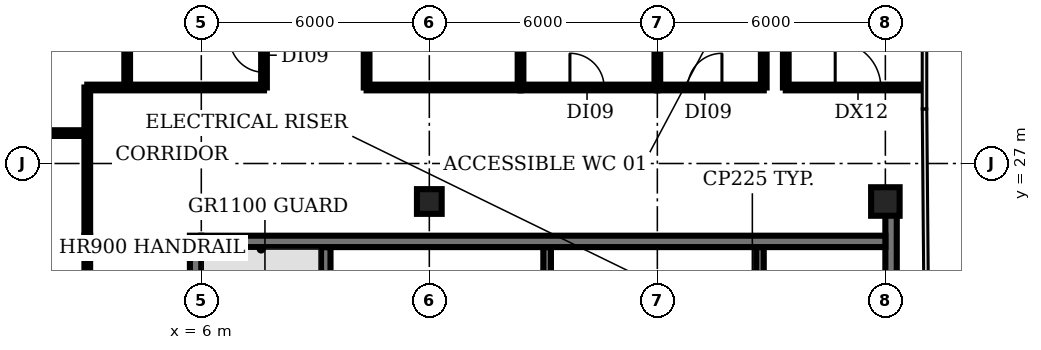
"""IFC4 building model, lengths in metres.
Left out: names, types, materials, properties, quantities, classifications, styles, units other than length and angle.
Written with IfcOpenShell. Run it as: python <this file> out.ifc"""

import sys

from ifc_helpers import new_model, si_unit, direction, frame, frame_2d, origin, origin_2d, place, context, subcontext, project, spatial, rectangle, extrude, element, fill, save


model = new_model("IFC4")
c1 = context("Model", 3, precision=1e-05, world=origin(), true_north=direction((0.0, 1.0)))
c2 = subcontext(c1, "Body", "Model", "MODEL_VIEW")
j1 = project(units=[si_unit("LENGTHUNIT", "METRE"), si_unit("PLANEANGLEUNIT", "RADIAN")], contexts=[c1])
p1 = place(None, origin())
s1 = spatial("IfcSite", under=j1, at=p1, CompositionType="ELEMENT")
p2 = place(p1, origin())
s2 = spatial("IfcBuilding", under=s1, at=p2, CompositionType="ELEMENT")
p3 = place(p2, frame((0.0, 0.0, 289.4)))
s3 = spatial("IfcBuildingStorey", under=s2, at=p3, CompositionType="ELEMENT", Elevation=289.4)
p4 = place(p3, frame((12.0, 26.0, 0.0), z_axis=(0.0, 0.0, 1.0), x_axis=(1.0, 0.0, 0.0)))
e1 = element("IfcColumn", 1, at=p4, inside=s3, PredefinedType="COLUMN", context=c2, shape_type="SweptSolid", body=[
    extrude(rectangle(XDim=0.65, YDim=0.65, at=origin_2d()), origin(), (0.0, 0.0, 1.0), 3.85),
])
p5 = place(p3, frame((24.0, 26.0, 0.0), z_axis=(0.0, 0.0, 1.0), x_axis=(1.0, 0.0, 0.0)))
e2 = element("IfcColumn", 2, at=p5, inside=s3, PredefinedType="COLUMN", context=c2, shape_type="SweptSolid", body=[
    extrude(rectangle(XDim=0.75, YDim=0.75, at=origin_2d()), origin(), (0.0, 0.0, 1.0), 3.85),
])
p6 = place(p3, frame((9.275, 18.375, 0.0), z_axis=(0.0, 0.0, 1.0), x_axis=(0.0, 1.0, 0.0)))
e3 = element("IfcWall", 3, at=p6, inside=s3, PredefinedType="SHEAR", context=c2, shape_type="SweptSolid", body=[
    extrude(rectangle(XDim=6.425, YDim=0.25, at=frame_2d((3.212, 0.0))), origin(), (0.0, 0.0, 1.0), 3.85),
])
for number, where, z_axis, x_axis in (
    (4, (15.1, 22.9, 0.0), (0.0, 0.0, 1.0), (0.0, 1.0, 0.0)),
    (5, (20.7, 22.9, 0.0), (0.0, 0.0, 1.0), (0.0, 1.0, 0.0)),
):
    element("IfcWall", number, at=place(p3, frame(where, z_axis=z_axis, x_axis=x_axis)), inside=s3, PredefinedType="SHEAR", context=c2, shape_type="SweptSolid", body=[
        extrude(rectangle(XDim=1.9, YDim=0.2, at=frame_2d((0.95, 0.0))), origin(), (0.0, 0.0, 1.0), 3.85),
    ])
p7 = place(p3, frame((5.85, 5.1, 0.0), z_axis=(0.0, 0.0, 1.0), x_axis=(0.0, 1.0, 0.0)))
e6 = element("IfcWall", 6, at=p7, inside=s3, PredefinedType="SHEAR", context=c2, shape_type="SweptSolid", body=[
    extrude(rectangle(XDim=20.0, YDim=0.3, at=frame_2d((10.0, 0.0))), origin(), (0.0, 0.0, 1.0), 3.85),
])
p8 = place(p7, frame((0.55, 0.0, 0.0)))
e7 = element("IfcOpeningElement", 7, at=p8, cuts=e6, PredefinedType="OPENING", context=c2, shape_type="SweptSolid", body=[
    extrude(rectangle(XDim=1.5, YDim=2.1, at=frame_2d((0.75, 1.05))), frame((0.0, 0.16, 0.0), z_axis=(0.0, -1.0, 0.0), x_axis=(1.0, 0.0, 0.0)), (0.0, 0.0, 1.0), 0.32),
])
p9 = place(p7, frame((7.0, 0.0, 0.0)))
e8 = element("IfcOpeningElement", 8, at=p9, cuts=e6, PredefinedType="OPENING", context=c2, shape_type="SweptSolid", body=[
    extrude(rectangle(XDim=1.2, YDim=2.1, at=frame_2d((0.6, 1.05))), frame((0.0, 0.16, 0.0), z_axis=(0.0, -1.0, 0.0), x_axis=(1.0, 0.0, 0.0)), (0.0, 0.0, 1.0), 0.32),
])
p10 = place(p7, frame((13.55, 0.0, 0.0)))
e9 = element("IfcOpeningElement", 9, at=p10, cuts=e6, PredefinedType="OPENING", context=c2, shape_type="SweptSolid", body=[
    extrude(rectangle(XDim=1.2, YDim=2.1, at=frame_2d((0.6, 1.05))), frame((0.0, 0.16, 0.0), z_axis=(0.0, -1.0, 0.0), x_axis=(1.0, 0.0, 0.0)), (0.0, 0.0, 1.0), 0.32),
])
p11 = place(p3, frame((24.15, 25.655, 0.0), z_axis=(0.0, 0.0, 1.0), x_axis=(0.0, -1.0, 0.0)))
e10 = element("IfcWall", 10, at=p11, inside=s3, PredefinedType="SHEAR", context=c2, shape_type="SweptSolid", body=[
    extrude(rectangle(XDim=20.555, YDim=0.3, at=frame_2d((10.277, 0.0))), origin(), (0.0, 0.0, 1.0), 3.85),
])
p12 = place(p11, frame((18.505, 0.0, 0.0)))
e11 = element("IfcOpeningElement", 11, at=p12, cuts=e10, PredefinedType="OPENING", context=c2, shape_type="SweptSolid", body=[
    extrude(rectangle(XDim=1.5, YDim=2.1, at=frame_2d((0.75, 1.05))), frame((0.0, 0.16, 0.0), z_axis=(0.0, -1.0, 0.0), x_axis=(1.0, 0.0, 0.0)), (0.0, 0.0, 1.0), 0.32),
])
p13 = place(p11, frame((12.405, 0.0, 0.0)))
e12 = element("IfcOpeningElement", 12, at=p13, cuts=e10, PredefinedType="OPENING", context=c2, shape_type="SweptSolid", body=[
    extrude(rectangle(XDim=0.9, YDim=2.1, at=frame_2d((0.45, 1.05))), frame((0.0, 0.16, 0.0), z_axis=(0.0, -1.0, 0.0), x_axis=(1.0, 0.0, 0.0)), (0.0, 0.0, 1.0), 0.32),
])
p14 = place(p11, frame((6.405, 0.0, 0.0)))
e13 = element("IfcOpeningElement", 13, at=p14, cuts=e10, PredefinedType="OPENING", context=c2, shape_type="SweptSolid", body=[
    extrude(rectangle(XDim=2.0, YDim=2.1, at=frame_2d((1.0, 1.05))), frame((0.0, 0.16, 0.0), z_axis=(0.0, -1.0, 0.0), x_axis=(1.0, 0.0, 0.0)), (0.0, 0.0, 1.0), 0.32),
])
p15 = place(p3, frame((6.0, 24.95, 0.0), z_axis=(0.0, 0.0, 1.0), x_axis=(1.0, 0.0, 0.0)))
e14 = element("IfcWall", 14, at=p15, inside=s3, PredefinedType="SHEAR", context=c2, shape_type="SweptSolid", body=[
    extrude(rectangle(XDim=18.0, YDim=0.3, at=frame_2d((9.0, 0.0))), origin(), (0.0, 0.0, 1.0), 3.85),
])
p16 = place(p3, frame((-0.98, 27.8, 0.0), z_axis=(0.0, 0.0, 1.0), x_axis=(1.0, 0.0, 0.0)))
e15 = element("IfcWall", 15, at=p16, inside=s3, PredefinedType="PARTITIONING", context=c2, shape_type="SweptSolid", body=[
    extrude(rectangle(XDim=3.98, YDim=0.15, at=frame_2d((1.99, 0.0))), origin(), (0.0, 0.0, 1.0), 2.9),
])
p17 = place(p3, frame((3.0, 5.1, 0.0), z_axis=(0.0, 0.0, 1.0), x_axis=(0.0, 1.0, 0.0)))
e16 = element("IfcWall", 16, at=p17, inside=s3, PredefinedType="PARTITIONING", context=c2, shape_type="SweptSolid", body=[
    extrude(rectangle(XDim=20.0, YDim=0.15, at=frame_2d((10.0, 0.0))), origin(), (0.0, 0.0, 1.0), 2.9),
])
p18 = place(p17, frame((9.3, 0.0, 0.0)))
e17 = element("IfcOpeningElement", 17, at=p18, cuts=e16, PredefinedType="OPENING", context=c2, shape_type="SweptSolid", body=[
    extrude(rectangle(XDim=1.2, YDim=2.1, at=frame_2d((0.6, 1.05))), frame((0.0, 0.085, 0.0), z_axis=(0.0, -1.0, 0.0), x_axis=(1.0, 0.0, 0.0)), (0.0, 0.0, 1.0), 0.17),
])
p19 = place(p3, frame((3.0, 25.1, 0.0), z_axis=(0.0, 0.0, 1.0), x_axis=(0.0, 1.0, 0.0)))
e18 = element("IfcWall", 18, at=p19, inside=s3, PredefinedType="PARTITIONING", context=c2, shape_type="SweptSolid", body=[
    extrude(rectangle(XDim=3.9, YDim=0.15, at=frame_2d((1.95, 0.0))), origin(), (0.0, 0.0, 1.0), 2.9),
])
p20 = place(p3, frame((3.0, 29.0, 0.0), z_axis=(0.0, 0.0, 1.0), x_axis=(1.0, 0.0, 0.0)))
e19 = element("IfcWall", 19, at=p20, inside=s3, PredefinedType="PARTITIONING", context=c2, shape_type="SweptSolid", body=[
    extrude(rectangle(XDim=4.65, YDim=0.15, at=frame_2d((2.325, 0.0))), origin(), (0.0, 0.0, 1.0), 2.9),
])
p21 = place(p3, frame((4.05, 29.0, 0.0), z_axis=(0.0, 0.0, 1.0), x_axis=(0.0, 1.0, 0.0)))
e20 = element("IfcWall", 20, at=p21, inside=s3, PredefinedType="PARTITIONING", context=c2, shape_type="SweptSolid", body=[
    extrude(rectangle(XDim=4.8, YDim=0.15, at=frame_2d((2.4, 0.0))), origin(), (0.0, 0.0, 1.0), 2.9),
])
p22 = place(p3, frame((7.65, 29.0, 0.0), z_axis=(0.0, 0.0, 1.0), x_axis=(0.0, 1.0, 0.0)))
e21 = element("IfcWall", 21, at=p22, inside=s3, PredefinedType="PARTITIONING", context=c2, shape_type="SweptSolid", body=[
    extrude(rectangle(XDim=4.8, YDim=0.15, at=frame_2d((2.4, 0.0))), origin(), (0.0, 0.0, 1.0), 2.9),
])
p23 = place(p22, frame((0.4, 0.0, 0.0)))
e22 = element("IfcOpeningElement", 22, at=p23, cuts=e21, PredefinedType="OPENING", context=c2, shape_type="SweptSolid", body=[
    extrude(rectangle(XDim=0.9, YDim=2.1, at=frame_2d((0.45, 1.05))), frame((0.0, 0.085, 0.0), z_axis=(0.0, -1.0, 0.0), x_axis=(1.0, 0.0, 0.0)), (0.0, 0.0, 1.0), 0.17),
])
p24 = place(p3, frame((10.35, 29.0, 0.0), z_axis=(0.0, 0.0, 1.0), x_axis=(0.0, 1.0, 0.0)))
e23 = element("IfcWall", 23, at=p24, inside=s3, PredefinedType="PARTITIONING", context=c2, shape_type="SweptSolid", body=[
    extrude(rectangle(XDim=4.8, YDim=0.15, at=frame_2d((2.4, 0.0))), origin(), (0.0, 0.0, 1.0), 2.9),
])
p25 = place(p3, frame((10.35, 29.0, 0.0), z_axis=(0.0, 0.0, 1.0), x_axis=(1.0, 0.0, 0.0)))
e24 = element("IfcWall", 24, at=p25, inside=s3, PredefinedType="PARTITIONING", context=c2, shape_type="SweptSolid", body=[
    extrude(rectangle(XDim=4.05, YDim=0.15, at=frame_2d((2.025, 0.0))), origin(), (0.0, 0.0, 1.0), 2.9),
])
p26 = place(p3, frame((14.4, 29.0, 0.0), z_axis=(0.0, 0.0, 1.0), x_axis=(0.0, 1.0, 0.0)))
e25 = element("IfcWall", 25, at=p26, inside=s3, PredefinedType="PARTITIONING", context=c2, shape_type="SweptSolid", body=[
    extrude(rectangle(XDim=4.8, YDim=0.15, at=frame_2d((2.4, 0.0))), origin(), (0.0, 0.0, 1.0), 2.9),
])
p27 = place(p3, frame((14.4, 29.0, 0.0), z_axis=(0.0, 0.0, 1.0), x_axis=(1.0, 0.0, 0.0)))
e26 = element("IfcWall", 26, at=p27, inside=s3, PredefinedType="PARTITIONING", context=c2, shape_type="SweptSolid", body=[
    extrude(rectangle(XDim=3.6, YDim=0.15, at=frame_2d((1.8, 0.0))), origin(), (0.0, 0.0, 1.0), 2.9),
])
p28 = place(p27, frame((1.3, 0.0, 0.0)))
e27 = element("IfcOpeningElement", 27, at=p28, cuts=e26, PredefinedType="OPENING", context=c2, shape_type="SweptSolid", body=[
    extrude(rectangle(XDim=0.9, YDim=2.1, at=frame_2d((0.45, 1.05))), frame((0.0, 0.085, 0.0), z_axis=(0.0, -1.0, 0.0), x_axis=(1.0, 0.0, 0.0)), (0.0, 0.0, 1.0), 0.17),
])
p29 = place(p3, frame((18.0, 29.0, 0.0), z_axis=(0.0, 0.0, 1.0), x_axis=(0.0, 1.0, 0.0)))
e28 = element("IfcWall", 28, at=p29, inside=s3, PredefinedType="PARTITIONING", context=c2, shape_type="SweptSolid", body=[
    extrude(rectangle(XDim=4.8, YDim=0.15, at=frame_2d((2.4, 0.0))), origin(), (0.0, 0.0, 1.0), 2.9),
])
p30 = place(p3, frame((18.0, 29.0, 0.0), z_axis=(0.0, 0.0, 1.0), x_axis=(1.0, 0.0, 0.0)))
e29 = element("IfcWall", 29, at=p30, inside=s3, PredefinedType="PARTITIONING", context=c2, shape_type="SweptSolid", body=[
    extrude(rectangle(XDim=2.8, YDim=0.15, at=frame_2d((1.4, 0.0))), origin(), (0.0, 0.0, 1.0), 2.9),
])
p31 = place(p30, frame((0.8, 0.0, 0.0)))
e30 = element("IfcOpeningElement", 30, at=p31, cuts=e29, PredefinedType="OPENING", context=c2, shape_type="SweptSolid", body=[
    extrude(rectangle(XDim=0.9, YDim=2.1, at=frame_2d((0.45, 1.05))), frame((0.0, 0.085, 0.0), z_axis=(0.0, -1.0, 0.0), x_axis=(1.0, 0.0, 0.0)), (0.0, 0.0, 1.0), 0.17),
])
for number, where, z_axis, x_axis in (
    (31, (20.8, 29.0, 0.0), (0.0, 0.0, 1.0), (0.0, 1.0, 0.0)),
    (32, (21.38, 29.0, 0.0), (0.0, 0.0, 1.0), (0.0, 1.0, 0.0)),
):
    element("IfcWall", number, at=place(p3, frame(where, z_axis=z_axis, x_axis=x_axis)), inside=s3, PredefinedType="PARTITIONING", context=c2, shape_type="SweptSolid", body=[
        extrude(rectangle(XDim=4.8, YDim=0.15, at=frame_2d((2.4, 0.0))), origin(), (0.0, 0.0, 1.0), 2.9),
    ])
p32 = place(p3, frame((21.38, 29.0, 0.0), z_axis=(0.0, 0.0, 1.0), x_axis=(1.0, 0.0, 0.0)))
e33 = element("IfcWall", 33, at=p32, inside=s3, PredefinedType="PARTITIONING", context=c2, shape_type="SweptSolid", body=[
    extrude(rectangle(XDim=3.6, YDim=0.15, at=frame_2d((1.8, 0.0))), origin(), (0.0, 0.0, 1.0), 2.9),
])
p33 = place(p32, frame((1.3, 0.0, 0.0)))
e34 = element("IfcOpeningElement", 34, at=p33, cuts=e33, PredefinedType="OPENING", context=c2, shape_type="SweptSolid", body=[
    extrude(rectangle(XDim=1.2, YDim=2.1, at=frame_2d((0.6, 1.05))), frame((0.0, 0.085, 0.0), z_axis=(0.0, -1.0, 0.0), x_axis=(1.0, 0.0, 0.0)), (0.0, 0.0, 1.0), 0.17),
])
p34 = place(p23, origin())
e35 = element("IfcDoor", 35, at=p34, inside=s3, OperationType="SINGLE_SWING_RIGHT", PredefinedType="DOOR", context=c2, shape_type="SweptSolid", body=[
    extrude(rectangle(XDim=0.9, YDim=2.1, at=frame_2d((0.45, 1.05))), frame((0.0, 0.025, 0.0), z_axis=(0.0, -1.0, 0.0), x_axis=(1.0, 0.0, 0.0)), (0.0, 0.0, 1.0), 0.05),
])
fill(e22, e35)
p35 = place(p28, origin())
e36 = element("IfcDoor", 36, at=p35, inside=s3, OperationType="SINGLE_SWING_LEFT", PredefinedType="DOOR", context=c2, shape_type="SweptSolid", body=[
    extrude(rectangle(XDim=0.9, YDim=2.1, at=frame_2d((0.45, 1.05))), frame((0.0, 0.025, 0.0), z_axis=(0.0, -1.0, 0.0), x_axis=(1.0, 0.0, 0.0)), (0.0, 0.0, 1.0), 0.05),
])
fill(e27, e36)
p36 = place(p31, origin())
e37 = element("IfcDoor", 37, at=p36, inside=s3, OperationType="SINGLE_SWING_RIGHT", PredefinedType="DOOR", context=c2, shape_type="SweptSolid", body=[
    extrude(rectangle(XDim=0.9, YDim=2.1, at=frame_2d((0.45, 1.05))), frame((0.0, 0.025, 0.0), z_axis=(0.0, -1.0, 0.0), x_axis=(1.0, 0.0, 0.0)), (0.0, 0.0, 1.0), 0.05),
])
fill(e30, e37)
p37 = place(p33, origin())
e38 = element("IfcDoor", 38, at=p37, inside=s3, OperationType="SINGLE_SWING_LEFT", PredefinedType="DOOR", context=c2, shape_type="SweptSolid", body=[
    extrude(rectangle(XDim=1.2, YDim=2.1, at=frame_2d((0.6, 1.05))), frame((0.0, 0.025, 0.0), z_axis=(0.0, -1.0, 0.0), x_axis=(1.0, 0.0, 0.0)), (0.0, 0.0, 1.0), 0.05),
])
fill(e34, e38)
save(model, sys.argv[1])
